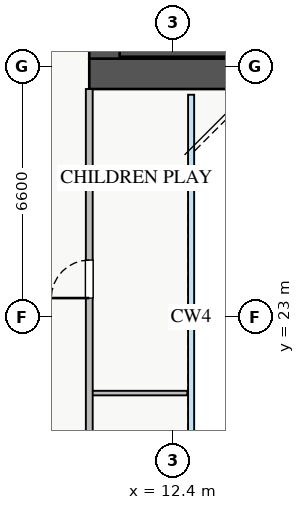
"""IFC4 building model, lengths in metres.
Left out: names, types, materials, properties, quantities, classifications, styles, units other than length and angle.
Written with IfcOpenShell. Run it as: python <this file> out.ifc"""

import sys

from ifc_helpers import new_model, si_unit, direction, frame, frame_2d, origin, place, context, subcontext, project, spatial, rectangle, extrude, source, transform, mapped, element, fill, save


model = new_model("IFC4")
c1 = context("Model", 3, precision=1e-05, world=origin(), true_north=direction((0.0, 1.0)))
c2 = subcontext(c1, "Body", "Model", "MODEL_VIEW")
j1 = project(units=[si_unit("LENGTHUNIT", "METRE"), si_unit("PLANEANGLEUNIT", "RADIAN")], contexts=[c1])
p1 = place(None, origin())
s1 = spatial("IfcSite", under=j1, at=p1, CompositionType="ELEMENT")
p2 = place(p1, origin())
s2 = spatial("IfcBuilding", under=s1, at=p2, CompositionType="ELEMENT")
p3 = place(p2, frame((0.0, 0.0, 63.25)))
s3 = spatial("IfcBuildingStorey", under=s2, at=p3, CompositionType="ELEMENT", Elevation=63.25)
p4 = place(p3, frame((11.0, 29.95, 0.0), z_axis=(0.0, 0.0, 1.0), x_axis=(1.0, 0.0, 0.0)))
e1 = element("IfcWall", 1, at=p4, inside=s3, PredefinedType="SHEAR", context=c2, shape_type="SweptSolid", body=[
    extrude(rectangle(XDim=7.15, YDim=0.2, at=frame_2d((3.575, 0.0))), origin(), (0.0, 0.0, 1.0), 3.25),
])
p5 = place(p3, frame((10.2, 29.4, 0.0), z_axis=(0.0, 0.0, 1.0), x_axis=(1.0, 0.0, 0.0)))
e2 = element("IfcWall", 2, at=p5, inside=s3, PredefinedType="SHEAR", context=c2, shape_type="SweptSolid", body=[
    extrude(rectangle(XDim=17.6, YDim=0.8, at=frame_2d((8.8, 0.0))), origin(), (0.0, 0.0, 1.0), 3.25),
])
p6 = place(p3, frame((10.6, 29.8, 0.0), z_axis=(0.0, 0.0, 1.0), x_axis=(0.0, 1.0, 0.0)))
e3 = element("IfcWall", 3, at=p6, inside=s3, PredefinedType="SHEAR", context=c2, shape_type="SweptSolid", body=[
    extrude(rectangle(XDim=5.6, YDim=0.8, at=frame_2d((2.8, 0.0))), origin(), (0.0, 0.0, 1.0), 3.25),
])
p7 = place(p3, frame((10.2, 21.0, 0.0), z_axis=(0.0, 0.0, 1.0), x_axis=(1.0, 0.0, 0.0)))
e4 = element("IfcWall", 4, at=p7, inside=s3, PredefinedType="PLUMBINGWALL", context=c2, shape_type="SweptSolid", body=[
    extrude(rectangle(XDim=2.58, YDim=0.12, at=frame_2d((1.29, 0.0))), origin(), (0.0, 0.0, 1.0), 3.07),
])
p8 = place(p3, frame((10.2, 17.0, 0.0), z_axis=(0.0, 0.0, 1.0), x_axis=(0.0, 1.0, 0.0)))
e5 = element("IfcWall", 5, at=p8, inside=s3, PredefinedType="PARTITIONING", context=c2, shape_type="SweptSolid", body=[
    extrude(rectangle(XDim=12.0, YDim=0.18, at=frame_2d((6.0, 0.0))), origin(), (0.0, 0.0, 1.0), 3.07),
])
p9 = place(p8, frame((1.5, 0.0, 0.0)))
e6 = element("IfcOpeningElement", 6, at=p9, cuts=e5, PredefinedType="OPENING", context=c2, shape_type="SweptSolid", body=[
    extrude(rectangle(XDim=0.85, YDim=2.05, at=frame_2d((0.425, 1.025))), frame((0.0, 0.1, 0.0), z_axis=(0.0, -1.0, 0.0), x_axis=(1.0, 0.0, 0.0)), (0.0, 0.0, 1.0), 0.2),
])
p10 = place(p8, frame((6.5, 0.0, 0.0)))
e7 = element("IfcOpeningElement", 7, at=p10, cuts=e5, PredefinedType="OPENING", context=c2, shape_type="SweptSolid", body=[
    extrude(rectangle(XDim=1.0, YDim=2.05, at=frame_2d((0.5, 1.025))), frame((0.0, 0.1, 0.0), z_axis=(0.0, -1.0, 0.0), x_axis=(1.0, 0.0, 0.0)), (0.0, 0.0, 1.0), 0.2),
])
m1 = source(origin(), c2, "Body", "SweptSolid", [
    extrude(rectangle(XDim=1.0, YDim=2.05, at=frame_2d((0.5, 1.025))), frame((0.0, 0.025, 0.0), z_axis=(0.0, -1.0, 0.0), x_axis=(1.0, 0.0, 0.0)), (0.0, 0.0, 1.0), 0.05),
])
p11 = place(p10, origin())
e8 = element("IfcDoor", 8, at=p11, inside=s3, OperationType="SINGLE_SWING_LEFT", PredefinedType="DOOR", context=c2, shape_type="MappedRepresentation", body=[
    mapped(m1, transform((0.0, 0.0, 0.0), x_axis=(1.0, 0.0, 0.0), y_axis=(0.0, 1.0, 0.0), z_axis=(0.0, 0.0, 1.0), scale=1.0)),
])
fill(e7, e8)
save(model, sys.argv[1])
